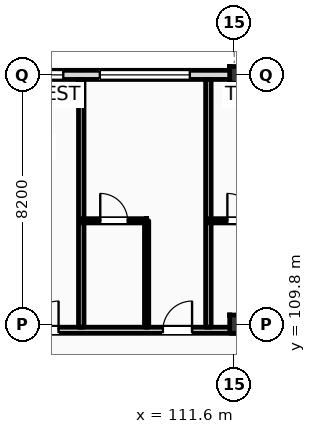
"""IFC4 building model, lengths in metres.
Left out: names, types, materials, properties, quantities, classifications, styles, units other than length and angle.
Written with IfcOpenShell. Run it as: python <this file> out.ifc"""

import sys

from ifc_helpers import new_model, si_unit, direction, frame, frame_2d, origin, origin_2d, place, context, subcontext, project, spatial, rectangle, i_section, extrude, element, fill, save


model = new_model("IFC4")
c1 = context("Model", 3, precision=1e-05, world=origin(), true_north=direction((0.0, 1.0)))
c2 = subcontext(c1, "Body", "Model", "MODEL_VIEW")
j1 = project(units=[si_unit("LENGTHUNIT", "METRE"), si_unit("PLANEANGLEUNIT", "RADIAN")], contexts=[c1])
p1 = place(None, origin())
s1 = spatial("IfcSite", under=j1, at=p1, CompositionType="ELEMENT")
p2 = place(p1, origin())
s2 = spatial("IfcBuilding", under=s1, at=p2, CompositionType="ELEMENT")
p3 = place(p2, frame((0.0, 0.0, 16.2)))
s3 = spatial("IfcBuildingStorey", under=s2, at=p3, CompositionType="ELEMENT", Elevation=16.2)
p4 = place(p3, frame((111.6, 109.8, 0.0), z_axis=(0.0, 0.0, 1.0), x_axis=(1.0, 0.0, 0.0)))
e1 = element("IfcColumn", 1, at=p4, inside=s3, PredefinedType="COLUMN", context=c2, shape_type="SweptSolid", body=[
    extrude(i_section(OverallWidth=0.3, OverallDepth=0.6, WebThickness=0.015, FlangeThickness=0.03, FilletRadius=0.027, at=origin_2d()), origin(), (0.0, 0.0, 1.0), 4.2),
])
p5 = place(p3, frame((111.6, 118.0, 0.0), z_axis=(0.0, 0.0, 1.0), x_axis=(1.0, 0.0, 0.0)))
e2 = element("IfcColumn", 2, at=p5, inside=s3, PredefinedType="COLUMN", context=c2, shape_type="SweptSolid", body=[
    extrude(i_section(OverallWidth=0.3, OverallDepth=0.55, WebThickness=0.015, FlangeThickness=0.029, FilletRadius=0.027, at=origin_2d()), origin(), (0.0, 0.0, 1.0), 4.2),
])
p6 = place(p3, frame((22.5, 118.0, 0.0), z_axis=(0.0, 0.0, 1.0), x_axis=(1.0, 0.0, 0.0)))
e3 = element("IfcWall", 3, at=p6, inside=s3, PredefinedType="STANDARD", context=c2, shape_type="SweptSolid", body=[
    extrude(rectangle(XDim=97.5, YDim=0.3, at=frame_2d((48.75, 0.0))), origin(), (0.0, 0.0, 1.0), 3.36),
])
p7 = place(p6, frame((3.721, 0.0, 0.9)))
e4 = element("IfcOpeningElement", 4, at=p7, cuts=e3, PredefinedType="OPENING", context=c2, shape_type="SweptSolid", body=[
    extrude(rectangle(XDim=0.9, YDim=1.8, at=frame_2d((0.45, 0.9))), frame((0.0, 0.16, 0.0), z_axis=(0.0, -1.0, 0.0), x_axis=(1.0, 0.0, 0.0)), (0.0, 0.0, 1.0), 0.32),
])
p8 = place(p6, frame((6.447, 0.0, 0.9)))
e5 = element("IfcOpeningElement", 5, at=p8, cuts=e3, PredefinedType="OPENING", context=c2, shape_type="SweptSolid", body=[
    extrude(rectangle(XDim=1.35, YDim=1.85, at=frame_2d((0.675, 0.925))), frame((0.0, 0.16, 0.0), z_axis=(0.0, -1.0, 0.0), x_axis=(1.0, 0.0, 0.0)), (0.0, 0.0, 1.0), 0.32),
])
p9 = place(p6, frame((11.363, 0.0, 0.9)))
e6 = element("IfcOpeningElement", 6, at=p9, cuts=e3, PredefinedType="OPENING", context=c2, shape_type="SweptSolid", body=[
    extrude(rectangle(XDim=1.5, YDim=1.9, at=frame_2d((0.75, 0.95))), frame((0.0, 0.16, 0.0), z_axis=(0.0, -1.0, 0.0), x_axis=(1.0, 0.0, 0.0)), (0.0, 0.0, 1.0), 0.32),
])
p10 = place(p6, frame((15.078, 0.0, 0.9)))
e7 = element("IfcOpeningElement", 7, at=p10, cuts=e3, PredefinedType="OPENING", context=c2, shape_type="SweptSolid", body=[
    extrude(rectangle(XDim=1.65, YDim=1.95, at=frame_2d((0.825, 0.975))), frame((0.0, 0.16, 0.0), z_axis=(0.0, -1.0, 0.0), x_axis=(1.0, 0.0, 0.0)), (0.0, 0.0, 1.0), 0.32),
])
p11 = place(p6, frame((19.395, 0.0, 0.9)))
e8 = element("IfcOpeningElement", 8, at=p11, cuts=e3, PredefinedType="OPENING", context=c2, shape_type="SweptSolid", body=[
    extrude(rectangle(XDim=1.8, YDim=2.0, at=frame_2d((0.9, 1.0))), frame((0.0, 0.16, 0.0), z_axis=(0.0, -1.0, 0.0), x_axis=(1.0, 0.0, 0.0)), (0.0, 0.0, 1.0), 0.32),
])
p12 = place(p6, frame((23.31, 0.0, 0.9)))
e9 = element("IfcOpeningElement", 9, at=p12, cuts=e3, PredefinedType="OPENING", context=c2, shape_type="SweptSolid", body=[
    extrude(rectangle(XDim=1.95, YDim=2.05, at=frame_2d((0.975, 1.025))), frame((0.0, 0.16, 0.0), z_axis=(0.0, -1.0, 0.0), x_axis=(1.0, 0.0, 0.0)), (0.0, 0.0, 1.0), 0.32),
])
p13 = place(p6, frame((28.026, 0.0, 0.9)))
e10 = element("IfcOpeningElement", 10, at=p13, cuts=e3, PredefinedType="OPENING", context=c2, shape_type="SweptSolid", body=[
    extrude(rectangle(XDim=2.1, YDim=2.1, at=frame_2d((1.05, 1.05))), frame((0.0, 0.16, 0.0), z_axis=(0.0, -1.0, 0.0), x_axis=(1.0, 0.0, 0.0)), (0.0, 0.0, 1.0), 0.32),
])
p14 = place(p6, frame((31.941, 0.0, 0.9)))
e11 = element("IfcOpeningElement", 11, at=p14, cuts=e3, PredefinedType="OPENING", context=c2, shape_type="SweptSolid", body=[
    extrude(rectangle(XDim=1.1, YDim=2.15, at=frame_2d((0.55, 1.075))), frame((0.0, 0.16, 0.0), z_axis=(0.0, -1.0, 0.0), x_axis=(1.0, 0.0, 0.0)), (0.0, 0.0, 1.0), 0.32),
])
p15 = place(p6, frame((36.657, 0.0, 0.9)))
e12 = element("IfcOpeningElement", 12, at=p15, cuts=e3, PredefinedType="OPENING", context=c2, shape_type="SweptSolid", body=[
    extrude(rectangle(XDim=2.4, YDim=2.2, at=frame_2d((1.2, 1.1))), frame((0.0, 0.16, 0.0), z_axis=(0.0, -1.0, 0.0), x_axis=(1.0, 0.0, 0.0)), (0.0, 0.0, 1.0), 0.32),
])
p16 = place(p6, frame((42.574, 0.0, 0.9)))
e13 = element("IfcOpeningElement", 13, at=p16, cuts=e3, PredefinedType="OPENING", context=c2, shape_type="SweptSolid", body=[
    extrude(rectangle(XDim=1.35, YDim=2.25, at=frame_2d((0.675, 1.125))), frame((0.0, 0.16, 0.0), z_axis=(0.0, -1.0, 0.0), x_axis=(1.0, 0.0, 0.0)), (0.0, 0.0, 1.0), 0.32),
])
p17 = place(p6, frame((45.289, 0.0, 0.9)))
e14 = element("IfcOpeningElement", 14, at=p17, cuts=e3, PredefinedType="OPENING", context=c2, shape_type="SweptSolid", body=[
    extrude(rectangle(XDim=2.7, YDim=2.28, at=frame_2d((1.35, 1.14))), frame((0.0, 0.16, 0.0), z_axis=(0.0, -1.0, 0.0), x_axis=(1.0, 0.0, 0.0)), (0.0, 0.0, 1.0), 0.32),
])
p18 = place(p6, frame((50.406, 0.0, 0.9)))
e15 = element("IfcOpeningElement", 15, at=p18, cuts=e3, PredefinedType="OPENING", context=c2, shape_type="SweptSolid", body=[
    extrude(rectangle(XDim=1.8, YDim=2.28, at=frame_2d((0.9, 1.14))), frame((0.0, 0.16, 0.0), z_axis=(0.0, -1.0, 0.0), x_axis=(1.0, 0.0, 0.0)), (0.0, 0.0, 1.0), 0.32),
])
p19 = place(p6, frame((53.922, 0.0, 0.9)))
e16 = element("IfcOpeningElement", 16, at=p19, cuts=e3, PredefinedType="OPENING", context=c2, shape_type="SweptSolid", body=[
    extrude(rectangle(XDim=1.8, YDim=2.28, at=frame_2d((0.9, 1.14))), frame((0.0, 0.16, 0.0), z_axis=(0.0, -1.0, 0.0), x_axis=(1.0, 0.0, 0.0)), (0.0, 0.0, 1.0), 0.32),
])
p20 = place(p6, frame((58.332, 0.0, 0.9)))
e17 = element("IfcOpeningElement", 17, at=p20, cuts=e3, PredefinedType="OPENING", context=c2, shape_type="SweptSolid", body=[
    extrude(rectangle(XDim=2.961, YDim=2.28, at=frame_2d((1.48, 1.14))), frame((0.0, 0.16, 0.0), z_axis=(0.0, -1.0, 0.0), x_axis=(1.0, 0.0, 0.0)), (0.0, 0.0, 1.0), 0.32),
])
p21 = place(p6, frame((62.513, 0.0, 0.9)))
e18 = element("IfcOpeningElement", 18, at=p21, cuts=e3, PredefinedType="OPENING", context=c2, shape_type="SweptSolid", body=[
    extrude(rectangle(XDim=1.8, YDim=2.28, at=frame_2d((0.9, 1.14))), frame((0.0, 0.16, 0.0), z_axis=(0.0, -1.0, 0.0), x_axis=(1.0, 0.0, 0.0)), (0.0, 0.0, 1.0), 0.32),
])
p22 = place(p6, frame((67.114, 0.0, 0.9)))
e19 = element("IfcOpeningElement", 19, at=p22, cuts=e3, PredefinedType="OPENING", context=c2, shape_type="SweptSolid", body=[
    extrude(rectangle(XDim=2.961, YDim=2.28, at=frame_2d((1.48, 1.14))), frame((0.0, 0.16, 0.0), z_axis=(0.0, -1.0, 0.0), x_axis=(1.0, 0.0, 0.0)), (0.0, 0.0, 1.0), 0.32),
])
p23 = place(p6, frame((73.695, 0.0, 0.9)))
e20 = element("IfcOpeningElement", 20, at=p23, cuts=e3, PredefinedType="OPENING", context=c2, shape_type="SweptSolid", body=[
    extrude(rectangle(XDim=1.1, YDim=2.28, at=frame_2d((0.55, 1.14))), frame((0.0, 0.16, 0.0), z_axis=(0.0, -1.0, 0.0), x_axis=(1.0, 0.0, 0.0)), (0.0, 0.0, 1.0), 0.32),
])
p24 = place(p6, frame((75.895, 0.0, 0.9)))
e21 = element("IfcOpeningElement", 21, at=p24, cuts=e3, PredefinedType="OPENING", context=c2, shape_type="SweptSolid", body=[
    extrude(rectangle(XDim=2.961, YDim=2.28, at=frame_2d((1.48, 1.14))), frame((0.0, 0.16, 0.0), z_axis=(0.0, -1.0, 0.0), x_axis=(1.0, 0.0, 0.0)), (0.0, 0.0, 1.0), 0.32),
])
p25 = place(p6, frame((81.676, 0.0, 0.9)))
e22 = element("IfcOpeningElement", 22, at=p25, cuts=e3, PredefinedType="OPENING", context=c2, shape_type="SweptSolid", body=[
    extrude(rectangle(XDim=1.8, YDim=2.28, at=frame_2d((0.9, 1.14))), frame((0.0, 0.16, 0.0), z_axis=(0.0, -1.0, 0.0), x_axis=(1.0, 0.0, 0.0)), (0.0, 0.0, 1.0), 0.32),
])
p26 = place(p6, frame((84.677, 0.0, 0.9)))
e23 = element("IfcOpeningElement", 23, at=p26, cuts=e3, PredefinedType="OPENING", context=c2, shape_type="SweptSolid", body=[
    extrude(rectangle(XDim=2.961, YDim=2.28, at=frame_2d((1.48, 1.14))), frame((0.0, 0.16, 0.0), z_axis=(0.0, -1.0, 0.0), x_axis=(1.0, 0.0, 0.0)), (0.0, 0.0, 1.0), 0.32),
])
p27 = place(p6, frame((89.999, 0.0, 0.9)))
e24 = element("IfcOpeningElement", 24, at=p27, cuts=e3, PredefinedType="OPENING", context=c2, shape_type="SweptSolid", body=[
    extrude(rectangle(XDim=1.1, YDim=1.5, at=frame_2d((0.55, 0.75))), frame((0.0, 0.16, 0.0), z_axis=(0.0, -1.0, 0.0), x_axis=(1.0, 0.0, 0.0)), (0.0, 0.0, 1.0), 0.32),
])
p28 = place(p6, frame((94.35, 0.0, 0.9)))
e25 = element("IfcOpeningElement", 25, at=p28, cuts=e3, PredefinedType="OPENING", context=c2, shape_type="SweptSolid", body=[
    extrude(rectangle(XDim=1.25, YDim=1.6, at=frame_2d((0.625, 0.8))), frame((0.0, 0.16, 0.0), z_axis=(0.0, -1.0, 0.0), x_axis=(1.0, 0.0, 0.0)), (0.0, 0.0, 1.0), 0.32),
])
p29 = place(p3, frame((10.65, 109.6, 0.0), z_axis=(0.0, 0.0, 1.0), x_axis=(1.0, 0.0, 0.0)))
e26 = element("IfcWall", 26, at=p29, inside=s3, PredefinedType="PARTITIONING", context=c2, shape_type="SweptSolid", body=[
    extrude(rectangle(XDim=109.21, YDim=0.2, at=frame_2d((54.605, 0.0))), origin(), (0.0, 0.0, 1.0), 3.36),
])
p30 = place(p29, frame((15.43, 0.0, 0.0)))
e27 = element("IfcOpeningElement", 27, at=p30, cuts=e26, PredefinedType="OPENING", context=c2, shape_type="SweptSolid", body=[
    extrude(rectangle(XDim=1.02, YDim=2.2, at=frame_2d((0.51, 1.1))), frame((0.0, 0.11, 0.0), z_axis=(0.0, -1.0, 0.0), x_axis=(1.0, 0.0, 0.0)), (0.0, 0.0, 1.0), 0.22),
])
p31 = place(p29, frame((19.537, 0.0, 0.0)))
e28 = element("IfcOpeningElement", 28, at=p31, cuts=e26, PredefinedType="OPENING", context=c2, shape_type="SweptSolid", body=[
    extrude(rectangle(XDim=1.02, YDim=2.2, at=frame_2d((0.51, 1.1))), frame((0.0, 0.11, 0.0), z_axis=(0.0, -1.0, 0.0), x_axis=(1.0, 0.0, 0.0)), (0.0, 0.0, 1.0), 0.22),
])
p32 = place(p29, frame((23.928, 0.0, 0.0)))
e29 = element("IfcOpeningElement", 29, at=p32, cuts=e26, PredefinedType="OPENING", context=c2, shape_type="SweptSolid", body=[
    extrude(rectangle(XDim=1.02, YDim=2.2, at=frame_2d((0.51, 1.1))), frame((0.0, 0.11, 0.0), z_axis=(0.0, -1.0, 0.0), x_axis=(1.0, 0.0, 0.0)), (0.0, 0.0, 1.0), 0.22),
])
p33 = place(p29, frame((26.169, 0.0, 0.0)))
e30 = element("IfcOpeningElement", 30, at=p33, cuts=e26, PredefinedType="OPENING", context=c2, shape_type="SweptSolid", body=[
    extrude(rectangle(XDim=1.02, YDim=2.2, at=frame_2d((0.51, 1.1))), frame((0.0, 0.11, 0.0), z_axis=(0.0, -1.0, 0.0), x_axis=(1.0, 0.0, 0.0)), (0.0, 0.0, 1.0), 0.22),
])
p34 = place(p29, frame((32.739, 0.0, 0.0)))
e31 = element("IfcOpeningElement", 31, at=p34, cuts=e26, PredefinedType="OPENING", context=c2, shape_type="SweptSolid", body=[
    extrude(rectangle(XDim=0.96, YDim=2.2, at=frame_2d((0.48, 1.1))), frame((0.0, 0.11, 0.0), z_axis=(0.0, -1.0, 0.0), x_axis=(1.0, 0.0, 0.0)), (0.0, 0.0, 1.0), 0.22),
])
p35 = place(p29, frame((34.98, 0.0, 0.0)))
e32 = element("IfcOpeningElement", 32, at=p35, cuts=e26, PredefinedType="OPENING", context=c2, shape_type="SweptSolid", body=[
    extrude(rectangle(XDim=0.96, YDim=2.2, at=frame_2d((0.48, 1.1))), frame((0.0, 0.11, 0.0), z_axis=(0.0, -1.0, 0.0), x_axis=(1.0, 0.0, 0.0)), (0.0, 0.0, 1.0), 0.22),
])
p36 = place(p29, frame((41.521, 0.0, 0.0)))
e33 = element("IfcOpeningElement", 33, at=p36, cuts=e26, PredefinedType="OPENING", context=c2, shape_type="SweptSolid", body=[
    extrude(rectangle(XDim=0.96, YDim=2.2, at=frame_2d((0.48, 1.1))), frame((0.0, 0.11, 0.0), z_axis=(0.0, -1.0, 0.0), x_axis=(1.0, 0.0, 0.0)), (0.0, 0.0, 1.0), 0.22),
])
p37 = place(p29, frame((43.512, 0.0, 0.0)))
e34 = element("IfcOpeningElement", 34, at=p37, cuts=e26, PredefinedType="OPENING", context=c2, shape_type="SweptSolid", body=[
    extrude(rectangle(XDim=0.96, YDim=2.2, at=frame_2d((0.48, 1.1))), frame((0.0, 0.11, 0.0), z_axis=(0.0, -1.0, 0.0), x_axis=(1.0, 0.0, 0.0)), (0.0, 0.0, 1.0), 0.22),
])
p38 = place(p29, frame((50.303, 0.0, 0.0)))
e35 = element("IfcOpeningElement", 35, at=p38, cuts=e26, PredefinedType="OPENING", context=c2, shape_type="SweptSolid", body=[
    extrude(rectangle(XDim=0.96, YDim=2.2, at=frame_2d((0.48, 1.1))), frame((0.0, 0.11, 0.0), z_axis=(0.0, -1.0, 0.0), x_axis=(1.0, 0.0, 0.0)), (0.0, 0.0, 1.0), 0.22),
])
p39 = place(p29, frame((54.944, 0.0, 0.0)))
e36 = element("IfcOpeningElement", 36, at=p39, cuts=e26, PredefinedType="OPENING", context=c2, shape_type="SweptSolid", body=[
    extrude(rectangle(XDim=0.96, YDim=2.2, at=frame_2d((0.48, 1.1))), frame((0.0, 0.11, 0.0), z_axis=(0.0, -1.0, 0.0), x_axis=(1.0, 0.0, 0.0)), (0.0, 0.0, 1.0), 0.22),
])
p40 = place(p29, frame((59.085, 0.0, 0.0)))
e37 = element("IfcOpeningElement", 37, at=p40, cuts=e26, PredefinedType="OPENING", context=c2, shape_type="SweptSolid", body=[
    extrude(rectangle(XDim=0.96, YDim=2.2, at=frame_2d((0.48, 1.1))), frame((0.0, 0.11, 0.0), z_axis=(0.0, -1.0, 0.0), x_axis=(1.0, 0.0, 0.0)), (0.0, 0.0, 1.0), 0.22),
])
p41 = place(p29, frame((63.476, 0.0, 0.0)))
e38 = element("IfcOpeningElement", 38, at=p41, cuts=e26, PredefinedType="OPENING", context=c2, shape_type="SweptSolid", body=[
    extrude(rectangle(XDim=0.96, YDim=2.2, at=frame_2d((0.48, 1.1))), frame((0.0, 0.11, 0.0), z_axis=(0.0, -1.0, 0.0), x_axis=(1.0, 0.0, 0.0)), (0.0, 0.0, 1.0), 0.22),
])
p42 = place(p29, frame((65.716, 0.0, 0.0)))
e39 = element("IfcOpeningElement", 39, at=p42, cuts=e26, PredefinedType="OPENING", context=c2, shape_type="SweptSolid", body=[
    extrude(rectangle(XDim=0.96, YDim=2.2, at=frame_2d((0.48, 1.1))), frame((0.0, 0.11, 0.0), z_axis=(0.0, -1.0, 0.0), x_axis=(1.0, 0.0, 0.0)), (0.0, 0.0, 1.0), 0.22),
])
p43 = place(p29, frame((72.257, 0.0, 0.0)))
e40 = element("IfcOpeningElement", 40, at=p43, cuts=e26, PredefinedType="OPENING", context=c2, shape_type="SweptSolid", body=[
    extrude(rectangle(XDim=0.96, YDim=2.2, at=frame_2d((0.48, 1.1))), frame((0.0, 0.11, 0.0), z_axis=(0.0, -1.0, 0.0), x_axis=(1.0, 0.0, 0.0)), (0.0, 0.0, 1.0), 0.22),
])
p44 = place(p29, frame((74.498, 0.0, 0.0)))
e41 = element("IfcOpeningElement", 41, at=p44, cuts=e26, PredefinedType="OPENING", context=c2, shape_type="SweptSolid", body=[
    extrude(rectangle(XDim=0.96, YDim=2.2, at=frame_2d((0.48, 1.1))), frame((0.0, 0.11, 0.0), z_axis=(0.0, -1.0, 0.0), x_axis=(1.0, 0.0, 0.0)), (0.0, 0.0, 1.0), 0.22),
])
p45 = place(p29, frame((81.039, 0.0, 0.0)))
e42 = element("IfcOpeningElement", 42, at=p45, cuts=e26, PredefinedType="OPENING", context=c2, shape_type="SweptSolid", body=[
    extrude(rectangle(XDim=0.96, YDim=2.2, at=frame_2d((0.48, 1.1))), frame((0.0, 0.11, 0.0), z_axis=(0.0, -1.0, 0.0), x_axis=(1.0, 0.0, 0.0)), (0.0, 0.0, 1.0), 0.22),
])
p46 = place(p29, frame((85.68, 0.0, 0.0)))
e43 = element("IfcOpeningElement", 43, at=p46, cuts=e26, PredefinedType="OPENING", context=c2, shape_type="SweptSolid", body=[
    extrude(rectangle(XDim=0.96, YDim=2.2, at=frame_2d((0.48, 1.1))), frame((0.0, 0.11, 0.0), z_axis=(0.0, -1.0, 0.0), x_axis=(1.0, 0.0, 0.0)), (0.0, 0.0, 1.0), 0.22),
])
p47 = place(p29, frame((89.82, 0.0, 0.0)))
e44 = element("IfcOpeningElement", 44, at=p47, cuts=e26, PredefinedType="OPENING", context=c2, shape_type="SweptSolid", body=[
    extrude(rectangle(XDim=0.96, YDim=2.2, at=frame_2d((0.48, 1.1))), frame((0.0, 0.11, 0.0), z_axis=(0.0, -1.0, 0.0), x_axis=(1.0, 0.0, 0.0)), (0.0, 0.0, 1.0), 0.22),
])
p48 = place(p29, frame((94.211, 0.0, 0.0)))
e45 = element("IfcOpeningElement", 45, at=p48, cuts=e26, PredefinedType="OPENING", context=c2, shape_type="SweptSolid", body=[
    extrude(rectangle(XDim=0.96, YDim=2.2, at=frame_2d((0.48, 1.1))), frame((0.0, 0.11, 0.0), z_axis=(0.0, -1.0, 0.0), x_axis=(1.0, 0.0, 0.0)), (0.0, 0.0, 1.0), 0.22),
])
p49 = place(p29, frame((98.602, 0.0, 0.0)))
e46 = element("IfcOpeningElement", 46, at=p49, cuts=e26, PredefinedType="OPENING", context=c2, shape_type="SweptSolid", body=[
    extrude(rectangle(XDim=0.96, YDim=2.2, at=frame_2d((0.48, 1.1))), frame((0.0, 0.11, 0.0), z_axis=(0.0, -1.0, 0.0), x_axis=(1.0, 0.0, 0.0)), (0.0, 0.0, 1.0), 0.22),
])
p50 = place(p29, frame((102.993, 0.0, 0.0)))
e47 = element("IfcOpeningElement", 47, at=p50, cuts=e26, PredefinedType="OPENING", context=c2, shape_type="SweptSolid", body=[
    extrude(rectangle(XDim=0.96, YDim=2.2, at=frame_2d((0.48, 1.1))), frame((0.0, 0.11, 0.0), z_axis=(0.0, -1.0, 0.0), x_axis=(1.0, 0.0, 0.0)), (0.0, 0.0, 1.0), 0.22),
])
p51 = place(p29, frame((105.269, 0.0, 0.0)))
e48 = element("IfcOpeningElement", 48, at=p51, cuts=e26, PredefinedType="OPENING", context=c2, shape_type="SweptSolid", body=[
    extrude(rectangle(XDim=0.96, YDim=2.2, at=frame_2d((0.48, 1.1))), frame((0.0, 0.11, 0.0), z_axis=(0.0, -1.0, 0.0), x_axis=(1.0, 0.0, 0.0)), (0.0, 0.0, 1.0), 0.22),
])
p52 = place(p29, frame((2.716, 0.0, 0.0)))
e49 = element("IfcOpeningElement", 49, at=p52, cuts=e26, PredefinedType="OPENING", context=c2, shape_type="SweptSolid", body=[
    extrude(rectangle(XDim=1.35, YDim=2.25, at=frame_2d((0.675, 1.125))), frame((0.0, 0.11, 0.0), z_axis=(0.0, -1.0, 0.0), x_axis=(1.0, 0.0, 0.0)), (0.0, 0.0, 1.0), 0.22),
])
p53 = place(p29, frame((6.65, 0.0, 0.0)))
e50 = element("IfcOpeningElement", 50, at=p53, cuts=e26, PredefinedType="OPENING", context=c2, shape_type="SweptSolid", body=[
    extrude(rectangle(XDim=1.35, YDim=2.25, at=frame_2d((0.675, 1.125))), frame((0.0, 0.11, 0.0), z_axis=(0.0, -1.0, 0.0), x_axis=(1.0, 0.0, 0.0)), (0.0, 0.0, 1.0), 0.22),
])
p54 = place(p29, frame((10.583, 0.0, 0.0)))
e51 = element("IfcOpeningElement", 51, at=p54, cuts=e26, PredefinedType="OPENING", context=c2, shape_type="SweptSolid", body=[
    extrude(rectangle(XDim=1.35, YDim=2.25, at=frame_2d((0.675, 1.125))), frame((0.0, 0.11, 0.0), z_axis=(0.0, -1.0, 0.0), x_axis=(1.0, 0.0, 0.0)), (0.0, 0.0, 1.0), 0.22),
])
for number, where, z_axis, x_axis in (
    (52, (106.567, 109.7, 0.0), (0.0, 0.0, 1.0), (0.0, 1.0, 0.0)),
    (53, (110.748, 109.7, 0.0), (0.0, 0.0, 1.0), (0.0, 1.0, 0.0)),
):
    element("IfcWall", number, at=place(p3, frame(where, z_axis=z_axis, x_axis=x_axis)), inside=s3, PredefinedType="PARTITIONING", context=c2, shape_type="SweptSolid", body=[
        extrude(rectangle(XDim=8.15, YDim=0.18, at=frame_2d((4.075, 0.0))), origin(), (0.0, 0.0, 1.0), 3.92),
    ])
p55 = place(p3, frame((108.717, 109.7, 0.0), z_axis=(0.0, 0.0, 1.0), x_axis=(0.0, 1.0, 0.0)))
e54 = element("IfcWall", 54, at=p55, inside=s3, PredefinedType="PARTITIONING", context=c2, shape_type="SweptSolid", body=[
    extrude(rectangle(XDim=3.5, YDim=0.14, at=frame_2d((1.75, 0.0))), origin(), (0.0, 0.0, 1.0), 3.61),
])
p56 = place(p3, frame((106.567, 113.2, 0.0), z_axis=(0.0, 0.0, 1.0), x_axis=(1.0, 0.0, 0.0)))
e55 = element("IfcWall", 55, at=p56, inside=s3, PredefinedType="PARTITIONING", context=c2, shape_type="SweptSolid", body=[
    extrude(rectangle(XDim=2.15, YDim=0.14, at=frame_2d((1.075, 0.0))), origin(), (0.0, 0.0, 1.0), 3.92),
])
p57 = place(p56, frame((0.625, 0.0, 0.0)))
e56 = element("IfcOpeningElement", 56, at=p57, cuts=e55, PredefinedType="OPENING", context=c2, shape_type="SweptSolid", body=[
    extrude(rectangle(XDim=0.9, YDim=2.1, at=frame_2d((0.45, 1.05))), frame((0.0, 0.08, 0.0), z_axis=(0.0, -1.0, 0.0), x_axis=(1.0, 0.0, 0.0)), (0.0, 0.0, 1.0), 0.16),
])
p58 = place(p3, frame((110.748, 113.2, 0.0), z_axis=(0.0, 0.0, 1.0), x_axis=(1.0, 0.0, 0.0)))
e57 = element("IfcWall", 57, at=p58, inside=s3, PredefinedType="PARTITIONING", context=c2, shape_type="SweptSolid", body=[
    extrude(rectangle(XDim=2.15, YDim=0.14, at=frame_2d((1.075, 0.0))), origin(), (0.0, 0.0, 1.0), 3.92),
])
p59 = place(p58, frame((0.625, 0.0, 0.0)))
e58 = element("IfcOpeningElement", 58, at=p59, cuts=e57, PredefinedType="OPENING", context=c2, shape_type="SweptSolid", body=[
    extrude(rectangle(XDim=0.9, YDim=2.1, at=frame_2d((0.45, 1.05))), frame((0.0, 0.08, 0.0), z_axis=(0.0, -1.0, 0.0), x_axis=(1.0, 0.0, 0.0)), (0.0, 0.0, 1.0), 0.16),
])
p60 = place(p25, origin())
e59 = element("IfcWindow", 59, at=p60, inside=s3, PartitioningType="DOUBLE_PANEL_VERTICAL", PredefinedType="WINDOW", context=c2, shape_type="SweptSolid", body=[
    extrude(rectangle(XDim=1.8, YDim=2.28, at=frame_2d((0.9, 1.14))), frame((0.0, 0.03, 0.0), z_axis=(0.0, -1.0, 0.0), x_axis=(1.0, 0.0, 0.0)), (0.0, 0.0, 1.0), 0.06),
])
fill(e22, e59)
p61 = place(p26, origin())
e60 = element("IfcWindow", 60, at=p61, inside=s3, PartitioningType="DOUBLE_PANEL_VERTICAL", PredefinedType="WINDOW", context=c2, shape_type="SweptSolid", body=[
    extrude(rectangle(XDim=2.961, YDim=2.28, at=frame_2d((1.48, 1.14))), frame((0.0, 0.03, 0.0), z_axis=(0.0, -1.0, 0.0), x_axis=(1.0, 0.0, 0.0)), (0.0, 0.0, 1.0), 0.06),
])
fill(e23, e60)
p62 = place(p48, origin())
e61 = element("IfcDoor", 61, at=p62, inside=s3, OperationType="SINGLE_SWING_RIGHT", PredefinedType="DOOR", context=c2, shape_type="SweptSolid", body=[
    extrude(rectangle(XDim=0.96, YDim=2.2, at=frame_2d((0.48, 1.1))), frame((0.0, 0.025, 0.0), z_axis=(0.0, -1.0, 0.0), x_axis=(1.0, 0.0, 0.0)), (0.0, 0.0, 1.0), 0.05),
])
fill(e45, e61)
p63 = place(p49, origin())
e62 = element("IfcDoor", 62, at=p63, inside=s3, OperationType="SINGLE_SWING_RIGHT", PredefinedType="DOOR", context=c2, shape_type="SweptSolid", body=[
    extrude(rectangle(XDim=0.96, YDim=2.2, at=frame_2d((0.48, 1.1))), frame((0.0, 0.025, 0.0), z_axis=(0.0, -1.0, 0.0), x_axis=(1.0, 0.0, 0.0)), (0.0, 0.0, 1.0), 0.05),
])
fill(e46, e62)
p64 = place(p57, origin())
e63 = element("IfcDoor", 63, at=p64, inside=s3, OperationType="SINGLE_SWING_LEFT", PredefinedType="DOOR", context=c2, shape_type="SweptSolid", body=[
    extrude(rectangle(XDim=0.9, YDim=2.1, at=frame_2d((0.45, 1.05))), frame((0.0, 0.025, 0.0), z_axis=(0.0, -1.0, 0.0), x_axis=(1.0, 0.0, 0.0)), (0.0, 0.0, 1.0), 0.05),
])
fill(e56, e63)
p65 = place(p59, origin())
e64 = element("IfcDoor", 64, at=p65, inside=s3, OperationType="SINGLE_SWING_LEFT", PredefinedType="DOOR", context=c2, shape_type="SweptSolid", body=[
    extrude(rectangle(XDim=0.9, YDim=2.1, at=frame_2d((0.45, 1.05))), frame((0.0, 0.025, 0.0), z_axis=(0.0, -1.0, 0.0), x_axis=(1.0, 0.0, 0.0)), (0.0, 0.0, 1.0), 0.05),
])
fill(e58, e64)
save(model, sys.argv[1])
